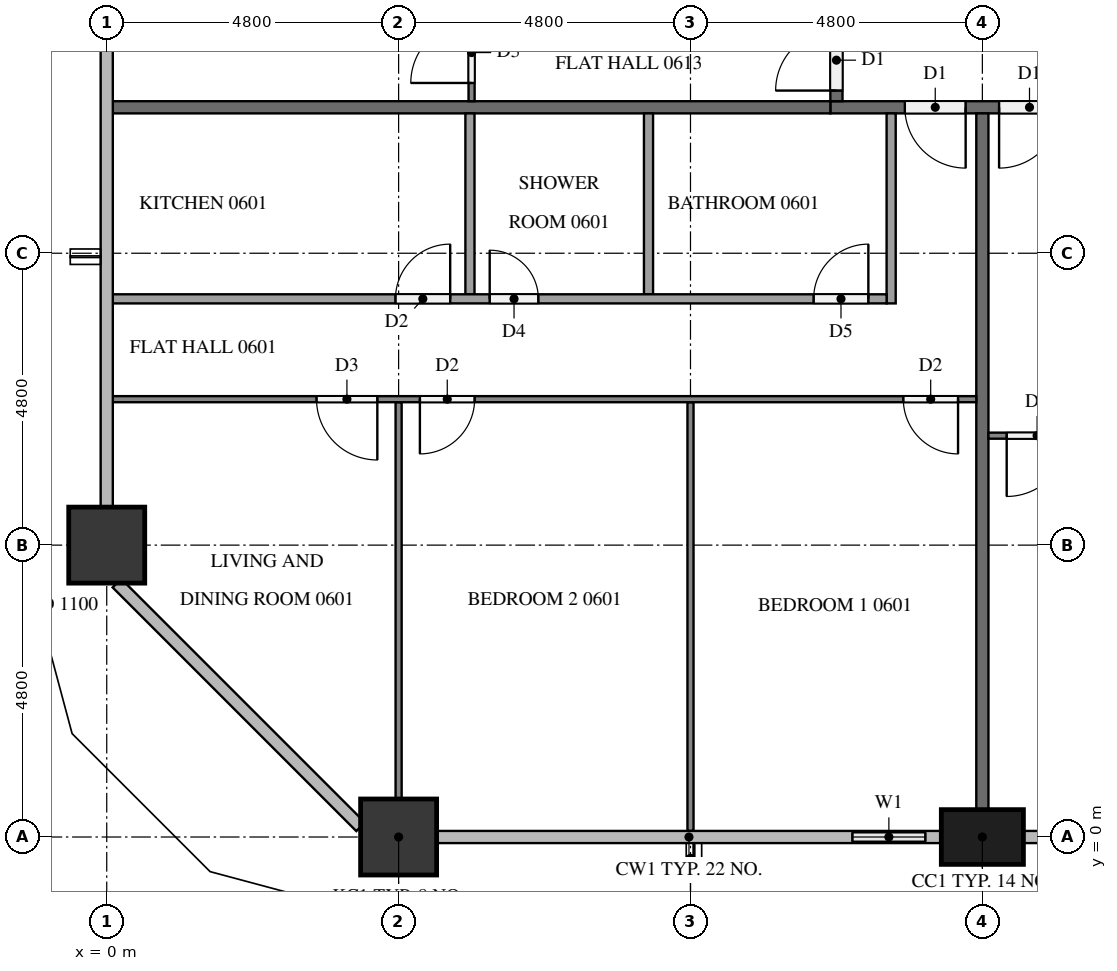
"""IFC4 building model, lengths in metres.
Left out: names, types, materials, properties, quantities, classifications, styles, units other than length and angle.
Written with IfcOpenShell. Run it as: python <this file> out.ifc"""

import sys

from ifc_helpers import new_model, si_unit, direction, frame, frame_2d, origin, origin_2d, place, context, subcontext, project, spatial, rectangle, extrude, element, fill, save


model = new_model("IFC4")
c1 = context("Model", 3, precision=1e-05, world=origin(), true_north=direction((0.0, 1.0)))
c2 = subcontext(c1, "Body", "Model", "MODEL_VIEW")
j1 = project(units=[si_unit("LENGTHUNIT", "METRE"), si_unit("PLANEANGLEUNIT", "RADIAN")], contexts=[c1])
p1 = place(None, origin())
s1 = spatial("IfcSite", under=j1, at=p1, CompositionType="ELEMENT")
p2 = place(p1, origin())
s2 = spatial("IfcBuilding", under=s1, at=p2, CompositionType="ELEMENT")
p3 = place(p2, frame((0.0, 0.0, 29.4)))
s3 = spatial("IfcBuildingStorey", under=s2, at=p3, CompositionType="ELEMENT", Elevation=29.4)
p4 = place(p3, frame((4.8, 0.0, 0.0), z_axis=(0.0, 0.0, 1.0), x_axis=(1.0, 0.0, 0.0)))
e1 = element("IfcColumn", 1, at=p4, inside=s3, PredefinedType="COLUMN", context=c2, shape_type="SweptSolid", body=[
    extrude(rectangle(XDim=1.25, YDim=1.25, at=origin_2d()), origin(), (0.0, 0.0, 1.0), 3.2),
])
p5 = place(p3, frame((14.4, 0.0, 0.0), z_axis=(0.0, 0.0, 1.0), x_axis=(1.0, 0.0, 0.0)))
e2 = element("IfcColumn", 2, at=p5, inside=s3, PredefinedType="COLUMN", context=c2, shape_type="SweptSolid", body=[
    extrude(rectangle(XDim=1.35, YDim=0.9, at=origin_2d()), origin(), (0.0, 0.0, 1.0), 3.2),
])
p6 = place(p3, frame((0.0, 4.8, 0.0), z_axis=(0.0, 0.0, 1.0), x_axis=(1.0, 0.0, 0.0)))
e3 = element("IfcColumn", 3, at=p6, inside=s3, PredefinedType="COLUMN", context=c2, shape_type="SweptSolid", body=[
    extrude(rectangle(XDim=1.25, YDim=1.25, at=origin_2d()), origin(), (0.0, 0.0, 1.0), 3.2),
])
p7 = place(p3, frame((12.0, 0.0, 0.0), z_axis=(0.0, 0.0, 1.0), x_axis=(1.0, 0.0, 0.0)))
e4 = element("IfcWall", 4, at=p7, inside=s3, PredefinedType="SOLIDWALL", context=c2, shape_type="SweptSolid", body=[
    extrude(rectangle(XDim=1.725, YDim=0.15, at=frame_2d((0.863, 0.0))), origin(), (0.0, 0.0, 1.0), 3.2),
])
p8 = place(p7, frame((0.262, 0.0, 0.9)))
e5 = element("IfcOpeningElement", 5, at=p8, cuts=e4, PredefinedType="OPENING", context=c2, shape_type="SweptSolid", body=[
    extrude(rectangle(XDim=1.2, YDim=1.4, at=frame_2d((0.6, 0.7))), frame((0.0, 0.085, 0.0), z_axis=(0.0, -1.0, 0.0), x_axis=(1.0, 0.0, 0.0)), (0.0, 0.0, 1.0), 0.17),
])
p9 = place(p3, frame((50.5, 12.0, 0.0), z_axis=(0.0, 0.0, 1.0), x_axis=(-1.0, 0.0, 0.0)))
e6 = element("IfcWall", 6, at=p9, inside=s3, PredefinedType="PARTITIONING", context=c2, shape_type="SweptSolid", body=[
    extrude(rectangle(XDim=38.6, YDim=0.2, at=frame_2d((19.3, 0.0))), origin(), (0.0, 0.0, 1.0), 3.2),
])
p10 = place(p9, frame((36.375, 0.0, 0.0)))
e7 = element("IfcOpeningElement", 7, at=p10, cuts=e6, PredefinedType="OPENING", context=c2, shape_type="SweptSolid", body=[
    extrude(rectangle(XDim=1.0, YDim=2.1, at=frame_2d((0.5, 1.05))), frame((0.0, 0.11, 0.0), z_axis=(0.0, -1.0, 0.0), x_axis=(1.0, 0.0, 0.0)), (0.0, 0.0, 1.0), 0.22),
])
p11 = place(p9, frame((34.825, 0.0, 0.0)))
e8 = element("IfcOpeningElement", 8, at=p11, cuts=e6, PredefinedType="OPENING", context=c2, shape_type="SweptSolid", body=[
    extrude(rectangle(XDim=1.0, YDim=2.1, at=frame_2d((0.5, 1.05))), frame((0.0, 0.11, 0.0), z_axis=(0.0, -1.0, 0.0), x_axis=(1.0, 0.0, 0.0)), (0.0, 0.0, 1.0), 0.22),
])
p12 = place(p9, frame((22.825, 0.0, 0.0)))
e9 = element("IfcOpeningElement", 9, at=p12, cuts=e6, PredefinedType="OPENING", context=c2, shape_type="SweptSolid", body=[
    extrude(rectangle(XDim=1.0, YDim=2.1, at=frame_2d((0.5, 1.05))), frame((0.0, 0.11, 0.0), z_axis=(0.0, -1.0, 0.0), x_axis=(1.0, 0.0, 0.0)), (0.0, 0.0, 1.0), 0.22),
])
p13 = place(p9, frame((8.425, 0.0, 0.0)))
e10 = element("IfcOpeningElement", 10, at=p13, cuts=e6, PredefinedType="OPENING", context=c2, shape_type="SweptSolid", body=[
    extrude(rectangle(XDim=1.0, YDim=2.1, at=frame_2d((0.5, 1.05))), frame((0.0, 0.11, 0.0), z_axis=(0.0, -1.0, 0.0), x_axis=(1.0, 0.0, 0.0)), (0.0, 0.0, 1.0), 0.22),
])
p14 = place(p9, frame((1.225, 0.0, 0.0)))
e11 = element("IfcOpeningElement", 11, at=p14, cuts=e6, PredefinedType="OPENING", context=c2, shape_type="SweptSolid", body=[
    extrude(rectangle(XDim=1.0, YDim=2.1, at=frame_2d((0.5, 1.05))), frame((0.0, 0.11, 0.0), z_axis=(0.0, -1.0, 0.0), x_axis=(1.0, 0.0, 0.0)), (0.0, 0.0, 1.0), 0.22),
])
p15 = place(p3, frame((12.0, 12.1, 0.0), z_axis=(0.0, 0.0, 1.0), x_axis=(0.0, 1.0, 0.0)))
e12 = element("IfcWall", 12, at=p15, inside=s3, PredefinedType="PARTITIONING", context=c2, shape_type="SweptSolid", body=[
    extrude(rectangle(XDim=28.6, YDim=0.2, at=frame_2d((14.3, 0.0))), origin(), (0.0, 0.0, 1.0), 3.2),
])
p16 = place(p15, frame((16.975, 0.0, 0.0)))
e13 = element("IfcOpeningElement", 13, at=p16, cuts=e12, PredefinedType="OPENING", context=c2, shape_type="SweptSolid", body=[
    extrude(rectangle(XDim=1.0, YDim=2.1, at=frame_2d((0.5, 1.05))), frame((0.0, 0.11, 0.0), z_axis=(0.0, -1.0, 0.0), x_axis=(1.0, 0.0, 0.0)), (0.0, 0.0, 1.0), 0.22),
])
p17 = place(p15, frame((0.175, 0.0, 0.0)))
e14 = element("IfcOpeningElement", 14, at=p17, cuts=e12, PredefinedType="OPENING", context=c2, shape_type="SweptSolid", body=[
    extrude(rectangle(XDim=1.0, YDim=2.1, at=frame_2d((0.5, 1.05))), frame((0.0, 0.11, 0.0), z_axis=(0.0, -1.0, 0.0), x_axis=(1.0, 0.0, 0.0)), (0.0, 0.0, 1.0), 0.22),
])
p18 = place(p3, frame((14.4, 11.9, 0.0), z_axis=(0.0, 0.0, 1.0), x_axis=(0.0, -1.0, 0.0)))
e15 = element("IfcWall", 15, at=p18, inside=s3, PredefinedType="PARTITIONING", context=c2, shape_type="SweptSolid", body=[
    extrude(rectangle(XDim=11.45, YDim=0.2, at=frame_2d((5.725, 0.0))), origin(), (0.0, 0.0, 1.0), 3.2),
])
p19 = place(p3, frame((0.1, 12.0, 0.0), z_axis=(0.0, 0.0, 1.0), x_axis=(1.0, 0.0, 0.0)))
e16 = element("IfcWall", 16, at=p19, inside=s3, PredefinedType="PARTITIONING", context=c2, shape_type="SweptSolid", body=[
    extrude(rectangle(XDim=11.8, YDim=0.2, at=frame_2d((5.9, 0.0))), origin(), (0.0, 0.0, 1.0), 3.2),
])
p20 = place(p3, frame((9.6, 7.15, 0.0), z_axis=(0.0, 0.0, 1.0), x_axis=(0.0, -1.0, 0.0)))
e17 = element("IfcWall", 17, at=p20, inside=s3, PredefinedType="PARTITIONING", context=c2, shape_type="SweptSolid", body=[
    extrude(rectangle(XDim=7.05, YDim=0.1, at=frame_2d((3.525, 0.0))), origin(), (0.0, 0.0, 1.0), 3.2),
])
p21 = place(p3, frame((4.8, 7.15, 0.0), z_axis=(0.0, 0.0, 1.0), x_axis=(0.0, -1.0, 0.0)))
e18 = element("IfcWall", 18, at=p21, inside=s3, PredefinedType="PARTITIONING", context=c2, shape_type="SweptSolid", body=[
    extrude(rectangle(XDim=6.525, YDim=0.1, at=frame_2d((3.262, 0.0))), origin(), (0.0, 0.0, 1.0), 3.2),
])
p22 = place(p3, frame((14.3, 7.2, 0.0), z_axis=(0.0, 0.0, 1.0), x_axis=(-1.0, 0.0, 0.0)))
e19 = element("IfcWall", 19, at=p22, inside=s3, PredefinedType="PARTITIONING", context=c2, shape_type="SweptSolid", body=[
    extrude(rectangle(XDim=14.2, YDim=0.1, at=frame_2d((7.1, 0.0))), origin(), (0.0, 0.0, 1.0), 3.2),
])
p23 = place(p22, frame((0.3, 0.0, 0.0)))
e20 = element("IfcOpeningElement", 20, at=p23, cuts=e19, PredefinedType="OPENING", context=c2, shape_type="SweptSolid", body=[
    extrude(rectangle(XDim=0.9, YDim=2.1, at=frame_2d((0.45, 1.05))), frame((0.0, 0.06, 0.0), z_axis=(0.0, -1.0, 0.0), x_axis=(1.0, 0.0, 0.0)), (0.0, 0.0, 1.0), 0.12),
])
p24 = place(p22, frame((8.25, 0.0, 0.0)))
e21 = element("IfcOpeningElement", 21, at=p24, cuts=e19, PredefinedType="OPENING", context=c2, shape_type="SweptSolid", body=[
    extrude(rectangle(XDim=0.9, YDim=2.1, at=frame_2d((0.45, 1.05))), frame((0.0, 0.06, 0.0), z_axis=(0.0, -1.0, 0.0), x_axis=(1.0, 0.0, 0.0)), (0.0, 0.0, 1.0), 0.12),
])
p25 = place(p22, frame((9.85, 0.0, 0.0)))
e22 = element("IfcOpeningElement", 22, at=p25, cuts=e19, PredefinedType="OPENING", context=c2, shape_type="SweptSolid", body=[
    extrude(rectangle(XDim=1.0, YDim=2.1, at=frame_2d((0.5, 1.05))), frame((0.0, 0.06, 0.0), z_axis=(0.0, -1.0, 0.0), x_axis=(1.0, 0.0, 0.0)), (0.0, 0.0, 1.0), 0.12),
])
for number, where, z_axis, x_axis in (
    (23, (8.91, 11.9, 0.0), (0.0, 0.0, 1.0), (0.0, -1.0, 0.0)),
    (24, (5.973, 11.9, 0.0), (0.0, 0.0, 1.0), (0.0, -1.0, 0.0)),
):
    element("IfcWall", number, at=place(p3, frame(where, z_axis=z_axis, x_axis=x_axis)), inside=s3, PredefinedType="PARTITIONING", context=c2, shape_type="SweptSolid", body=[
        extrude(rectangle(XDim=2.975, YDim=0.15, at=frame_2d((1.487, 0.0))), origin(), (0.0, 0.0, 1.0), 3.2),
    ])
p26 = place(p3, frame((12.9, 11.9, 0.0), z_axis=(0.0, 0.0, 1.0), x_axis=(0.0, -1.0, 0.0)))
e25 = element("IfcWall", 25, at=p26, inside=s3, PredefinedType="PARTITIONING", context=c2, shape_type="SweptSolid", body=[
    extrude(rectangle(XDim=3.125, YDim=0.15, at=frame_2d((1.562, 0.0))), origin(), (0.0, 0.0, 1.0), 3.2),
])
p27 = place(p3, frame((0.1, 8.85, 0.0), z_axis=(0.0, 0.0, 1.0), x_axis=(1.0, 0.0, 0.0)))
e26 = element("IfcWall", 26, at=p27, inside=s3, PredefinedType="PARTITIONING", context=c2, shape_type="SweptSolid", body=[
    extrude(rectangle(XDim=12.725, YDim=0.15, at=frame_2d((6.362, 0.0))), origin(), (0.0, 0.0, 1.0), 3.2),
])
p28 = place(p27, frame((11.525, 0.0, 0.0)))
e27 = element("IfcOpeningElement", 27, at=p28, cuts=e26, PredefinedType="OPENING", context=c2, shape_type="SweptSolid", body=[
    extrude(rectangle(XDim=0.9, YDim=2.1, at=frame_2d((0.45, 1.05))), frame((0.0, 0.085, 0.0), z_axis=(0.0, -1.0, 0.0), x_axis=(1.0, 0.0, 0.0)), (0.0, 0.0, 1.0), 0.17),
])
p29 = place(p27, frame((6.198, 0.0, 0.0)))
e28 = element("IfcOpeningElement", 28, at=p29, cuts=e26, PredefinedType="OPENING", context=c2, shape_type="SweptSolid", body=[
    extrude(rectangle(XDim=0.8, YDim=2.1, at=frame_2d((0.4, 1.05))), frame((0.0, 0.085, 0.0), z_axis=(0.0, -1.0, 0.0), x_axis=(1.0, 0.0, 0.0)), (0.0, 0.0, 1.0), 0.17),
])
p30 = place(p27, frame((4.648, 0.0, 0.0)))
e29 = element("IfcOpeningElement", 29, at=p30, cuts=e26, PredefinedType="OPENING", context=c2, shape_type="SweptSolid", body=[
    extrude(rectangle(XDim=0.9, YDim=2.1, at=frame_2d((0.45, 1.05))), frame((0.0, 0.085, 0.0), z_axis=(0.0, -1.0, 0.0), x_axis=(1.0, 0.0, 0.0)), (0.0, 0.0, 1.0), 0.17),
])
p31 = place(p3, frame((26.3, 6.6, 0.0), z_axis=(0.0, 0.0, 1.0), x_axis=(-1.0, 0.0, 0.0)))
e30 = element("IfcWall", 30, at=p31, inside=s3, PredefinedType="PARTITIONING", context=c2, shape_type="SweptSolid", body=[
    extrude(rectangle(XDim=11.8, YDim=0.1, at=frame_2d((5.9, 0.0))), origin(), (0.0, 0.0, 1.0), 3.2),
])
p32 = place(p31, frame((10.5, 0.0, 0.0)))
e31 = element("IfcOpeningElement", 31, at=p32, cuts=e30, PredefinedType="OPENING", context=c2, shape_type="SweptSolid", body=[
    extrude(rectangle(XDim=1.0, YDim=2.1, at=frame_2d((0.5, 1.05))), frame((0.0, 0.06, 0.0), z_axis=(0.0, -1.0, 0.0), x_axis=(1.0, 0.0, 0.0)), (0.0, 0.0, 1.0), 0.12),
])
p33 = place(p31, frame((0.3, 0.0, 0.0)))
e32 = element("IfcOpeningElement", 32, at=p33, cuts=e30, PredefinedType="OPENING", context=c2, shape_type="SweptSolid", body=[
    extrude(rectangle(XDim=0.9, YDim=2.1, at=frame_2d((0.45, 1.05))), frame((0.0, 0.06, 0.0), z_axis=(0.0, -1.0, 0.0), x_axis=(1.0, 0.0, 0.0)), (0.0, 0.0, 1.0), 0.12),
])
p34 = place(p3, frame((6.0, 12.1, 0.0), z_axis=(0.0, 0.0, 1.0), x_axis=(0.0, 1.0, 0.0)))
e33 = element("IfcWall", 33, at=p34, inside=s3, PredefinedType="PARTITIONING", context=c2, shape_type="SweptSolid", body=[
    extrude(rectangle(XDim=16.6, YDim=0.1, at=frame_2d((8.3, 0.0))), origin(), (0.0, 0.0, 1.0), 3.2),
])
p35 = place(p34, frame((0.3, 0.0, 0.0)))
e34 = element("IfcOpeningElement", 34, at=p35, cuts=e33, PredefinedType="OPENING", context=c2, shape_type="SweptSolid", body=[
    extrude(rectangle(XDim=1.0, YDim=2.1, at=frame_2d((0.5, 1.05))), frame((0.0, 0.06, 0.0), z_axis=(0.0, -1.0, 0.0), x_axis=(1.0, 0.0, 0.0)), (0.0, 0.0, 1.0), 0.12),
])
p36 = place(p34, frame((10.65, 0.0, 0.0)))
e35 = element("IfcOpeningElement", 35, at=p36, cuts=e33, PredefinedType="OPENING", context=c2, shape_type="SweptSolid", body=[
    extrude(rectangle(XDim=0.9, YDim=2.1, at=frame_2d((0.45, 1.05))), frame((0.0, 0.06, 0.0), z_axis=(0.0, -1.0, 0.0), x_axis=(1.0, 0.0, 0.0)), (0.0, 0.0, 1.0), 0.12),
])
p37 = place(p34, frame((12.25, 0.0, 0.0)))
e36 = element("IfcOpeningElement", 36, at=p37, cuts=e33, PredefinedType="OPENING", context=c2, shape_type="SweptSolid", body=[
    extrude(rectangle(XDim=0.9, YDim=2.1, at=frame_2d((0.45, 1.05))), frame((0.0, 0.06, 0.0), z_axis=(0.0, -1.0, 0.0), x_axis=(1.0, 0.0, 0.0)), (0.0, 0.0, 1.0), 0.12),
])
p38 = place(p8, origin())
e37 = element("IfcWindow", 37, at=p38, inside=s3, PartitioningType="SINGLE_PANEL", PredefinedType="WINDOW", context=c2, shape_type="SweptSolid", body=[
    extrude(rectangle(XDim=1.2, YDim=1.4, at=frame_2d((0.6, 0.7))), frame((0.0, 0.03, 0.0), z_axis=(0.0, -1.0, 0.0), x_axis=(1.0, 0.0, 0.0)), (0.0, 0.0, 1.0), 0.06),
])
fill(e5, e37)
p39 = place(p10, origin())
e38 = element("IfcDoor", 38, at=p39, inside=s3, OperationType="SINGLE_SWING_LEFT", PredefinedType="DOOR", context=c2, shape_type="SweptSolid", body=[
    extrude(rectangle(XDim=1.0, YDim=2.1, at=frame_2d((0.5, 1.05))), frame((0.0, 0.025, 0.0), z_axis=(0.0, -1.0, 0.0), x_axis=(1.0, 0.0, 0.0)), (0.0, 0.0, 1.0), 0.05),
])
fill(e7, e38)
p40 = place(p11, origin())
e39 = element("IfcDoor", 39, at=p40, inside=s3, OperationType="SINGLE_SWING_RIGHT", PredefinedType="DOOR", context=c2, shape_type="SweptSolid", body=[
    extrude(rectangle(XDim=1.0, YDim=2.1, at=frame_2d((0.5, 1.05))), frame((0.0, 0.025, 0.0), z_axis=(0.0, -1.0, 0.0), x_axis=(1.0, 0.0, 0.0)), (0.0, 0.0, 1.0), 0.05),
])
fill(e8, e39)
p41 = place(p17, origin())
e40 = element("IfcDoor", 40, at=p41, inside=s3, OperationType="SINGLE_SWING_LEFT", PredefinedType="DOOR", context=c2, shape_type="SweptSolid", body=[
    extrude(rectangle(XDim=1.0, YDim=2.1, at=frame_2d((0.5, 1.05))), frame((0.0, 0.025, 0.0), z_axis=(0.0, -1.0, 0.0), x_axis=(1.0, 0.0, 0.0)), (0.0, 0.0, 1.0), 0.05),
])
fill(e14, e40)
p42 = place(p23, origin())
e41 = element("IfcDoor", 41, at=p42, inside=s3, OperationType="SINGLE_SWING_LEFT", PredefinedType="DOOR", context=c2, shape_type="SweptSolid", body=[
    extrude(rectangle(XDim=0.9, YDim=2.1, at=frame_2d((0.45, 1.05))), frame((0.0, 0.025, 0.0), z_axis=(0.0, -1.0, 0.0), x_axis=(1.0, 0.0, 0.0)), (0.0, 0.0, 1.0), 0.05),
])
fill(e20, e41)
p43 = place(p24, origin())
e42 = element("IfcDoor", 42, at=p43, inside=s3, OperationType="SINGLE_SWING_RIGHT", PredefinedType="DOOR", context=c2, shape_type="SweptSolid", body=[
    extrude(rectangle(XDim=0.9, YDim=2.1, at=frame_2d((0.45, 1.05))), frame((0.0, 0.025, 0.0), z_axis=(0.0, -1.0, 0.0), x_axis=(1.0, 0.0, 0.0)), (0.0, 0.0, 1.0), 0.05),
])
fill(e21, e42)
p44 = place(p25, origin())
e43 = element("IfcDoor", 43, at=p44, inside=s3, OperationType="SINGLE_SWING_LEFT", PredefinedType="DOOR", context=c2, shape_type="SweptSolid", body=[
    extrude(rectangle(XDim=1.0, YDim=2.1, at=frame_2d((0.5, 1.05))), frame((0.0, 0.025, 0.0), z_axis=(0.0, -1.0, 0.0), x_axis=(1.0, 0.0, 0.0)), (0.0, 0.0, 1.0), 0.05),
])
fill(e22, e43)
p45 = place(p28, origin())
e44 = element("IfcDoor", 44, at=p45, inside=s3, OperationType="SINGLE_SWING_RIGHT", PredefinedType="DOOR", context=c2, shape_type="SweptSolid", body=[
    extrude(rectangle(XDim=0.9, YDim=2.1, at=frame_2d((0.45, 1.05))), frame((0.0, 0.025, 0.0), z_axis=(0.0, -1.0, 0.0), x_axis=(1.0, 0.0, 0.0)), (0.0, 0.0, 1.0), 0.05),
])
fill(e27, e44)
p46 = place(p29, origin())
e45 = element("IfcDoor", 45, at=p46, inside=s3, OperationType="SINGLE_SWING_LEFT", PredefinedType="DOOR", context=c2, shape_type="SweptSolid", body=[
    extrude(rectangle(XDim=0.8, YDim=2.1, at=frame_2d((0.4, 1.05))), frame((0.0, 0.025, 0.0), z_axis=(0.0, -1.0, 0.0), x_axis=(1.0, 0.0, 0.0)), (0.0, 0.0, 1.0), 0.05),
])
fill(e28, e45)
p47 = place(p30, origin())
e46 = element("IfcDoor", 46, at=p47, inside=s3, OperationType="SINGLE_SWING_RIGHT", PredefinedType="DOOR", context=c2, shape_type="SweptSolid", body=[
    extrude(rectangle(XDim=0.9, YDim=2.1, at=frame_2d((0.45, 1.05))), frame((0.0, 0.025, 0.0), z_axis=(0.0, -1.0, 0.0), x_axis=(1.0, 0.0, 0.0)), (0.0, 0.0, 1.0), 0.05),
])
fill(e29, e46)
p48 = place(p32, origin())
e47 = element("IfcDoor", 47, at=p48, inside=s3, OperationType="SINGLE_SWING_RIGHT", PredefinedType="DOOR", context=c2, shape_type="SweptSolid", body=[
    extrude(rectangle(XDim=1.0, YDim=2.1, at=frame_2d((0.5, 1.05))), frame((0.0, 0.025, 0.0), z_axis=(0.0, -1.0, 0.0), x_axis=(1.0, 0.0, 0.0)), (0.0, 0.0, 1.0), 0.05),
])
fill(e31, e47)
p49 = place(p35, origin())
e48 = element("IfcDoor", 48, at=p49, inside=s3, OperationType="SINGLE_SWING_LEFT", PredefinedType="DOOR", context=c2, shape_type="SweptSolid", body=[
    extrude(rectangle(XDim=1.0, YDim=2.1, at=frame_2d((0.5, 1.05))), frame((0.0, 0.025, 0.0), z_axis=(0.0, -1.0, 0.0), x_axis=(1.0, 0.0, 0.0)), (0.0, 0.0, 1.0), 0.05),
])
fill(e34, e48)
save(model, sys.argv[1])
